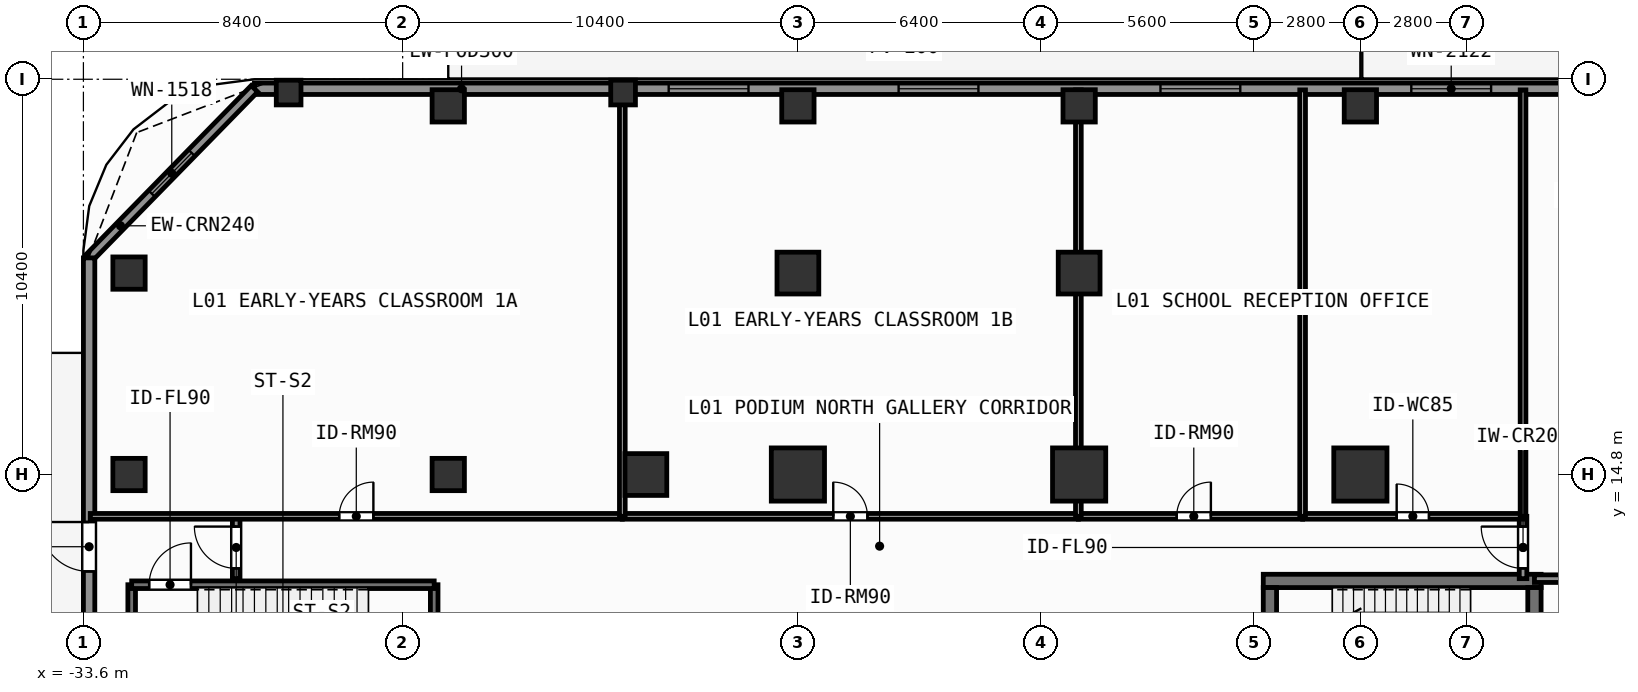
"""IFC4 building model, lengths in metres.
Left out: names, types, materials, properties, quantities, classifications, styles, units other than length and angle.
Written with IfcOpenShell. Run it as: python <this file> out.ifc"""

import sys

from ifc_helpers import new_model, si_unit, direction, frame, frame_2d, origin, origin_2d, place, context, subcontext, project, spatial, rectangle, extrude, element, fill, save


model = new_model("IFC4")
c1 = context("Model", 3, precision=1e-05, world=origin(), true_north=direction((0.0, 1.0)))
c2 = subcontext(c1, "Body", "Model", "MODEL_VIEW")
j1 = project(units=[si_unit("LENGTHUNIT", "METRE"), si_unit("PLANEANGLEUNIT", "RADIAN")], contexts=[c1])
p1 = place(None, origin())
s1 = spatial("IfcSite", under=j1, at=p1, CompositionType="ELEMENT")
p2 = place(p1, origin())
s2 = spatial("IfcBuilding", under=s1, at=p2, CompositionType="ELEMENT")
p3 = place(p2, origin())
s3 = spatial("IfcBuildingStorey", under=s2, at=p3, CompositionType="ELEMENT", Elevation=0.0)
p4 = place(p3, frame((-2.555, 12.0, 0.0), z_axis=(0.0, 0.0, 1.0), x_axis=(1.0, 0.0, 0.0)))
e1 = element("IfcWall", 1, at=p4, inside=s3, PredefinedType="SHEAR", context=c2, shape_type="SweptSolid", body=[
    extrude(rectangle(XDim=7.31, YDim=0.35, at=frame_2d((3.655, 0.0))), origin(), (0.0, 0.0, 1.0), 4.8),
])
p5 = place(p3, frame((-2.38, 8.9, 0.0), z_axis=(0.0, 0.0, 1.0), x_axis=(0.0, 1.0, 0.0)))
e2 = element("IfcWall", 2, at=p5, inside=s3, PredefinedType="SHEAR", context=c2, shape_type="SweptSolid", body=[
    extrude(rectangle(XDim=2.925, YDim=0.35, at=frame_2d((1.462, 0.0))), origin(), (0.0, 0.0, 1.0), 4.8),
])
p6 = place(p3, frame((4.58, 11.825, 0.0), z_axis=(0.0, 0.0, 1.0), x_axis=(0.0, -1.0, 0.0)))
e3 = element("IfcWall", 3, at=p6, inside=s3, PredefinedType="SHEAR", context=c2, shape_type="SweptSolid", body=[
    extrude(rectangle(XDim=2.925, YDim=0.35, at=frame_2d((1.462, 0.0))), origin(), (0.0, 0.0, 1.0), 4.8),
])
p7 = place(p6, frame((0.913, 0.0, 0.0)))
e4 = element("IfcOpeningElement", 4, at=p7, cuts=e3, PredefinedType="OPENING", context=c2, shape_type="SweptSolid", body=[
    extrude(rectangle(XDim=1.1, YDim=2.15, at=frame_2d((0.55, 1.075))), frame((0.0, 0.185, 0.0), z_axis=(0.0, -1.0, 0.0), x_axis=(1.0, 0.0, 0.0)), (0.0, 0.0, 1.0), 0.37),
])
for number, where, z_axis, x_axis in (
    (5, (-14.8, 14.8, 0.0), (0.0, 0.0, 1.0), (1.0, 0.0, 0.0)),
    (6, (-7.4, 14.8, 0.0), (0.0, 0.0, 1.0), (1.0, 0.0, 0.0)),
    (7, (0.0, 14.8, 0.0), (0.0, 0.0, 1.0), (1.0, 0.0, 0.0)),
):
    element("IfcColumn", number, at=place(p3, frame(where, z_axis=z_axis, x_axis=x_axis)), inside=s3, PredefinedType="COLUMN", context=c2, shape_type="SweptSolid", body=[
        extrude(rectangle(XDim=1.4, YDim=1.4, at=origin_2d()), origin(), (0.0, 0.0, 1.0), 4.8),
    ])
for number, where, z_axis, x_axis in (
    (8, (-18.8, 14.8, 0.0), (0.0, 0.0, 1.0), (1.0, 0.0, 0.0)),
    (9, (-14.8, 20.1, 0.0), (0.0, 0.0, 1.0), (1.0, 0.0, 0.0)),
    (10, (-7.4, 20.1, 0.0), (0.0, 0.0, 1.0), (1.0, 0.0, 0.0)),
):
    element("IfcColumn", number, at=place(p3, frame(where, z_axis=z_axis, x_axis=x_axis)), inside=s3, PredefinedType="COLUMN", context=c2, shape_type="SweptSolid", body=[
        extrude(rectangle(XDim=1.1, YDim=1.1, at=origin_2d()), origin(), (0.0, 0.0, 1.0), 4.8),
    ])
for number, where, z_axis, x_axis in (
    (11, (-32.4, 14.8, 0.0), (0.0, 0.0, 1.0), (1.0, 0.0, 0.0)),
    (12, (-24.0, 14.8, 0.0), (0.0, 0.0, 1.0), (1.0, 0.0, 0.0)),
    (13, (-24.0, 24.5, 0.0), (0.0, 0.0, 1.0), (1.0, 0.0, 0.0)),
    (14, (-14.8, 24.5, 0.0), (0.0, 0.0, 1.0), (1.0, 0.0, 0.0)),
    (15, (-7.4, 24.5, 0.0), (0.0, 0.0, 1.0), (1.0, 0.0, 0.0)),
    (16, (0.0, 24.5, 0.0), (0.0, 0.0, 1.0), (1.0, 0.0, 0.0)),
    (17, (-32.4, 20.1, 0.0), (0.0, 0.0, 1.0), (1.0, 0.0, 0.0)),
):
    element("IfcColumn", number, at=place(p3, frame(where, z_axis=z_axis, x_axis=x_axis)), inside=s3, PredefinedType="COLUMN", context=c2, shape_type="SweptSolid", body=[
        extrude(rectangle(XDim=0.85, YDim=0.85, at=origin_2d()), origin(), (0.0, 0.0, 1.0), 4.8),
    ])
for number, where, z_axis, x_axis in (
    (18, (-28.2, 24.85, 0.0), (0.0, 0.0, 1.0), (1.0, 0.0, 0.0)),
    (19, (-19.4, 24.85, 0.0), (0.0, 0.0, 1.0), (1.0, 0.0, 0.0)),
):
    element("IfcColumn", number, at=place(p3, frame(where, z_axis=z_axis, x_axis=x_axis)), inside=s3, PredefinedType="PILASTER", context=c2, shape_type="SweptSolid", body=[
        extrude(rectangle(XDim=0.65, YDim=0.65, at=origin_2d()), origin(), (0.0, 0.0, 1.0), 4.8),
    ])
p8 = place(p3, frame((-29.1, 24.95, 0.0), z_axis=(0.0, 0.0, 1.0), x_axis=(1.0, 0.0, 0.0)))
e20 = element("IfcWall", 20, at=p8, inside=s3, PredefinedType="SOLIDWALL", context=c2, shape_type="SweptSolid", body=[
    extrude(rectangle(XDim=58.2, YDim=0.3, at=frame_2d((29.1, 0.0))), origin(), (0.0, 0.0, 1.0), 4.56),
])
p9 = place(p8, frame((10.9, 0.0, 0.85)))
e21 = element("IfcOpeningElement", 21, at=p9, cuts=e20, PredefinedType="OPENING", context=c2, shape_type="SweptSolid", body=[
    extrude(rectangle(XDim=2.1, YDim=2.2, at=frame_2d((1.05, 1.1))), frame((0.0, 0.16, 0.0), z_axis=(0.0, -1.0, 0.0), x_axis=(1.0, 0.0, 0.0)), (0.0, 0.0, 1.0), 0.32),
])
p10 = place(p8, frame((16.95, 0.0, 0.85)))
e22 = element("IfcOpeningElement", 22, at=p10, cuts=e20, PredefinedType="OPENING", context=c2, shape_type="SweptSolid", body=[
    extrude(rectangle(XDim=2.1, YDim=2.2, at=frame_2d((1.05, 1.1))), frame((0.0, 0.16, 0.0), z_axis=(0.0, -1.0, 0.0), x_axis=(1.0, 0.0, 0.0)), (0.0, 0.0, 1.0), 0.32),
])
p11 = place(p8, frame((23.84, 0.0, 0.85)))
e23 = element("IfcOpeningElement", 23, at=p11, cuts=e20, PredefinedType="OPENING", context=c2, shape_type="SweptSolid", body=[
    extrude(rectangle(XDim=2.1, YDim=2.2, at=frame_2d((1.05, 1.1))), frame((0.0, 0.16, 0.0), z_axis=(0.0, -1.0, 0.0), x_axis=(1.0, 0.0, 0.0)), (0.0, 0.0, 1.0), 0.32),
])
p12 = place(p8, frame((30.44, 0.0, 0.85)))
e24 = element("IfcOpeningElement", 24, at=p12, cuts=e20, PredefinedType="OPENING", context=c2, shape_type="SweptSolid", body=[
    extrude(rectangle(XDim=2.1, YDim=2.2, at=frame_2d((1.05, 1.1))), frame((0.0, 0.16, 0.0), z_axis=(0.0, -1.0, 0.0), x_axis=(1.0, 0.0, 0.0)), (0.0, 0.0, 1.0), 0.32),
])
p13 = place(p8, frame((39.25, 0.0, 0.0)))
e25 = element("IfcOpeningElement", 25, at=p13, cuts=e20, PredefinedType="OPENING", context=c2, shape_type="SweptSolid", body=[
    extrude(rectangle(XDim=1.3, YDim=2.2, at=frame_2d((0.65, 1.1))), frame((0.0, 0.16, 0.0), z_axis=(0.0, -1.0, 0.0), x_axis=(1.0, 0.0, 0.0)), (0.0, 0.0, 1.0), 0.32),
])
p14 = place(p8, frame((49.25, 0.0, 0.0)))
e26 = element("IfcOpeningElement", 26, at=p14, cuts=e20, PredefinedType="OPENING", context=c2, shape_type="SweptSolid", body=[
    extrude(rectangle(XDim=1.3, YDim=2.2, at=frame_2d((0.65, 1.1))), frame((0.0, 0.16, 0.0), z_axis=(0.0, -1.0, 0.0), x_axis=(1.0, 0.0, 0.0)), (0.0, 0.0, 1.0), 0.32),
])
p15 = place(p3, frame((-33.45, 20.5, 0.0), z_axis=(0.0, 0.0, 1.0), x_axis=(0.69901822973, 0.715103848756, 0.0)))
e27 = element("IfcWall", 27, at=p15, inside=s3, PredefinedType="SOLIDWALL", context=c2, shape_type="SweptSolid", body=[
    extrude(rectangle(XDim=6.223, YDim=0.24, at=frame_2d((3.111, 0.0))), origin(), (0.0, 0.0, 1.0), 4.56),
])
p16 = place(p15, frame((2.362, 0.0, 0.85)))
e28 = element("IfcOpeningElement", 28, at=p16, cuts=e27, PredefinedType="OPENING", context=c2, shape_type="SweptSolid", body=[
    extrude(rectangle(XDim=1.5, YDim=1.85, at=frame_2d((0.75, 0.925))), frame((0.0, 0.13, 0.0), z_axis=(0.0, -1.0, 0.0), x_axis=(1.0, 0.0, 0.0)), (0.0, 0.0, 1.0), 0.26),
])
p17 = place(p3, frame((-33.45, -20.5, 0.0), z_axis=(0.0, 0.0, 1.0), x_axis=(0.0, 1.0, 0.0)))
e29 = element("IfcWall", 29, at=p17, inside=s3, PredefinedType="SOLIDWALL", context=c2, shape_type="SweptSolid", body=[
    extrude(rectangle(XDim=41.0, YDim=0.3, at=frame_2d((20.5, 0.0))), origin(), (0.0, 0.0, 1.0), 4.56),
])
p18 = place(p17, frame((15.9, 0.0, 0.0)))
e30 = element("IfcOpeningElement", 30, at=p18, cuts=e29, PredefinedType="OPENING", context=c2, shape_type="SweptSolid", body=[
    extrude(rectangle(XDim=2.0, YDim=2.4, at=frame_2d((1.0, 1.2))), frame((0.0, 0.16, 0.0), z_axis=(0.0, -1.0, 0.0), x_axis=(1.0, 0.0, 0.0)), (0.0, 0.0, 1.0), 0.32),
])
p19 = place(p17, frame((23.1, 0.0, 0.0)))
e31 = element("IfcOpeningElement", 31, at=p19, cuts=e29, PredefinedType="OPENING", context=c2, shape_type="SweptSolid", body=[
    extrude(rectangle(XDim=2.0, YDim=2.4, at=frame_2d((1.0, 1.2))), frame((0.0, 0.16, 0.0), z_axis=(0.0, -1.0, 0.0), x_axis=(1.0, 0.0, 0.0)), (0.0, 0.0, 1.0), 0.32),
])
p20 = place(p17, frame((6.95, 0.0, 0.0)))
e32 = element("IfcOpeningElement", 32, at=p20, cuts=e29, PredefinedType="OPENING", context=c2, shape_type="SweptSolid", body=[
    extrude(rectangle(XDim=1.3, YDim=2.2, at=frame_2d((0.65, 1.1))), frame((0.0, 0.16, 0.0), z_axis=(0.0, -1.0, 0.0), x_axis=(1.0, 0.0, 0.0)), (0.0, 0.0, 1.0), 0.32),
])
p21 = place(p17, frame((32.75, 0.0, 0.0)))
e33 = element("IfcOpeningElement", 33, at=p21, cuts=e29, PredefinedType="OPENING", context=c2, shape_type="SweptSolid", body=[
    extrude(rectangle(XDim=1.3, YDim=2.2, at=frame_2d((0.65, 1.1))), frame((0.0, 0.16, 0.0), z_axis=(0.0, -1.0, 0.0), x_axis=(1.0, 0.0, 0.0)), (0.0, 0.0, 1.0), 0.32),
])
for number, where, z_axis, x_axis in (
    (34, (-32.33, 8.48, 0.0), (0.0, 0.0, 1.0), (0.0, 1.0, 0.0)),
    (35, (-24.37, 11.9, 0.0), (0.0, 0.0, 1.0), (0.0, -1.0, 0.0)),
):
    element("IfcWall", number, at=place(p3, frame(where, z_axis=z_axis, x_axis=x_axis)), inside=s3, PredefinedType="SHEAR", context=c2, shape_type="SweptSolid", body=[
        extrude(rectangle(XDim=3.42, YDim=0.2, at=frame_2d((1.71, 0.0))), origin(), (0.0, 0.0, 1.0), 4.56),
    ])
p22 = place(p3, frame((-32.33, 11.9, 0.0), z_axis=(0.0, 0.0, 1.0), x_axis=(1.0, 0.0, 0.0)))
e36 = element("IfcWall", 36, at=p22, inside=s3, PredefinedType="SHEAR", context=c2, shape_type="SweptSolid", body=[
    extrude(rectangle(XDim=7.96, YDim=0.2, at=frame_2d((3.98, 0.0))), origin(), (0.0, 0.0, 1.0), 4.56),
])
p23 = place(p22, frame((0.46, 0.0, 0.0)))
e37 = element("IfcOpeningElement", 37, at=p23, cuts=e36, PredefinedType="OPENING", context=c2, shape_type="SweptSolid", body=[
    extrude(rectangle(XDim=1.1, YDim=2.15, at=frame_2d((0.55, 1.075))), frame((0.0, 0.11, 0.0), z_axis=(0.0, -1.0, 0.0), x_axis=(1.0, 0.0, 0.0)), (0.0, 0.0, 1.0), 0.22),
])
p24 = place(p3, frame((4.58, 12.06, 0.0), z_axis=(0.0, 0.0, 1.0), x_axis=(1.0, 0.0, 0.0)))
e38 = element("IfcWall", 38, at=p24, inside=s3, PredefinedType="SOLIDWALL", context=c2, shape_type="SweptSolid", body=[
    extrude(rectangle(XDim=3.7, YDim=0.2, at=frame_2d((1.85, 0.0))), origin(), (0.0, 0.0, 1.0), 4.56),
])
p25 = place(p24, frame((1.212, 0.0, 0.0)))
e39 = element("IfcOpeningElement", 39, at=p25, cuts=e38, PredefinedType="OPENING", context=c2, shape_type="SweptSolid", body=[
    extrude(rectangle(XDim=1.1, YDim=2.15, at=frame_2d((0.55, 1.075))), frame((0.0, 0.11, 0.0), z_axis=(0.0, -1.0, 0.0), x_axis=(1.0, 0.0, 0.0)), (0.0, 0.0, 1.0), 0.22),
])
p26 = place(p3, frame((-29.58, 12.06, 0.0), z_axis=(0.0, 0.0, 1.0), x_axis=(0.0, 1.0, 0.0)))
e40 = element("IfcWall", 40, at=p26, inside=s3, PredefinedType="SOLIDWALL", context=c2, shape_type="SweptSolid", body=[
    extrude(rectangle(XDim=1.64, YDim=0.2, at=frame_2d((0.82, 0.0))), origin(), (0.0, 0.0, 1.0), 4.56),
])
p27 = place(p26, frame((0.27, 0.0, 0.0)))
e41 = element("IfcOpeningElement", 41, at=p27, cuts=e40, PredefinedType="OPENING", context=c2, shape_type="SweptSolid", body=[
    extrude(rectangle(XDim=1.1, YDim=2.15, at=frame_2d((0.55, 1.075))), frame((0.0, 0.11, 0.0), z_axis=(0.0, -1.0, 0.0), x_axis=(1.0, 0.0, 0.0)), (0.0, 0.0, 1.0), 0.22),
])
p28 = place(p3, frame((4.28, 12.06, 0.0), z_axis=(0.0, 0.0, 1.0), x_axis=(0.0, 1.0, 0.0)))
e42 = element("IfcWall", 42, at=p28, inside=s3, PredefinedType="SOLIDWALL", context=c2, shape_type="SweptSolid", body=[
    extrude(rectangle(XDim=1.64, YDim=0.2, at=frame_2d((0.82, 0.0))), origin(), (0.0, 0.0, 1.0), 4.56),
])
p29 = place(p28, frame((0.27, 0.0, 0.0)))
e43 = element("IfcOpeningElement", 43, at=p29, cuts=e42, PredefinedType="OPENING", context=c2, shape_type="SweptSolid", body=[
    extrude(rectangle(XDim=1.1, YDim=2.15, at=frame_2d((0.55, 1.075))), frame((0.0, 0.11, 0.0), z_axis=(0.0, -1.0, 0.0), x_axis=(1.0, 0.0, 0.0)), (0.0, 0.0, 1.0), 0.22),
])
p30 = place(p3, frame((-33.42, 13.7, 0.0), z_axis=(0.0, 0.0, 1.0), x_axis=(1.0, 0.0, 0.0)))
e44 = element("IfcWall", 44, at=p30, inside=s3, PredefinedType="PARTITIONING", context=c2, shape_type="SweptSolid", body=[
    extrude(rectangle(XDim=14.0, YDim=0.15, at=frame_2d((7.0, 0.0))), origin(), (0.0, 0.0, 1.0), 4.56),
])
p31 = place(p30, frame((6.55, 0.0, 0.0)))
e45 = element("IfcOpeningElement", 45, at=p31, cuts=e44, PredefinedType="OPENING", context=c2, shape_type="SweptSolid", body=[
    extrude(rectangle(XDim=0.9, YDim=2.1, at=frame_2d((0.45, 1.05))), frame((0.0, 0.085, 0.0), z_axis=(0.0, -1.0, 0.0), x_axis=(1.0, 0.0, 0.0)), (0.0, 0.0, 1.0), 0.17),
])
p32 = place(p3, frame((-19.42, 13.7, 0.0), z_axis=(0.0, 0.0, 1.0), x_axis=(1.0, 0.0, 0.0)))
e46 = element("IfcWall", 46, at=p32, inside=s3, PredefinedType="PARTITIONING", context=c2, shape_type="SweptSolid", body=[
    extrude(rectangle(XDim=12.0, YDim=0.15, at=frame_2d((6.0, 0.0))), origin(), (0.0, 0.0, 1.0), 4.56),
])
p33 = place(p32, frame((5.55, 0.0, 0.0)))
e47 = element("IfcOpeningElement", 47, at=p33, cuts=e46, PredefinedType="OPENING", context=c2, shape_type="SweptSolid", body=[
    extrude(rectangle(XDim=0.9, YDim=2.1, at=frame_2d((0.45, 1.05))), frame((0.0, 0.085, 0.0), z_axis=(0.0, -1.0, 0.0), x_axis=(1.0, 0.0, 0.0)), (0.0, 0.0, 1.0), 0.17),
])
p34 = place(p3, frame((-7.42, 13.7, 0.0), z_axis=(0.0, 0.0, 1.0), x_axis=(1.0, 0.0, 0.0)))
e48 = element("IfcWall", 48, at=p34, inside=s3, PredefinedType="PARTITIONING", context=c2, shape_type="SweptSolid", body=[
    extrude(rectangle(XDim=5.9, YDim=0.15, at=frame_2d((2.95, 0.0))), origin(), (0.0, 0.0, 1.0), 4.56),
])
p35 = place(p34, frame((2.587, 0.0, 0.0)))
e49 = element("IfcOpeningElement", 49, at=p35, cuts=e48, PredefinedType="OPENING", context=c2, shape_type="SweptSolid", body=[
    extrude(rectangle(XDim=0.9, YDim=2.1, at=frame_2d((0.45, 1.05))), frame((0.0, 0.085, 0.0), z_axis=(0.0, -1.0, 0.0), x_axis=(1.0, 0.0, 0.0)), (0.0, 0.0, 1.0), 0.17),
])
p36 = place(p3, frame((-1.52, 13.7, 0.0), z_axis=(0.0, 0.0, 1.0), x_axis=(1.0, 0.0, 0.0)))
e50 = element("IfcWall", 50, at=p36, inside=s3, PredefinedType="PARTITIONING", context=c2, shape_type="SweptSolid", body=[
    extrude(rectangle(XDim=5.8, YDim=0.15, at=frame_2d((2.9, 0.0))), origin(), (0.0, 0.0, 1.0), 4.56),
])
p37 = place(p36, frame((2.475, 0.0, 0.0)))
e51 = element("IfcOpeningElement", 51, at=p37, cuts=e50, PredefinedType="OPENING", context=c2, shape_type="SweptSolid", body=[
    extrude(rectangle(XDim=0.85, YDim=2.1, at=frame_2d((0.425, 1.05))), frame((0.0, 0.085, 0.0), z_axis=(0.0, -1.0, 0.0), x_axis=(1.0, 0.0, 0.0)), (0.0, 0.0, 1.0), 0.17),
])
p38 = place(p3, frame((-19.42, 13.7, 0.0), z_axis=(0.0, 0.0, 1.0), x_axis=(0.0, 1.0, 0.0)))
e52 = element("IfcWall", 52, at=p38, inside=s3, PredefinedType="PARTITIONING", context=c2, shape_type="SweptSolid", body=[
    extrude(rectangle(XDim=11.22, YDim=0.15, at=frame_2d((5.61, 0.0))), origin(), (0.0, 0.0, 1.0), 4.56),
])
p39 = place(p3, frame((-7.42, 13.7, 0.0), z_axis=(0.0, 0.0, 1.0), x_axis=(0.0, 1.0, 0.0)))
e53 = element("IfcWall", 53, at=p39, inside=s3, PredefinedType="PARTITIONING", context=c2, shape_type="SweptSolid", body=[
    extrude(rectangle(XDim=11.22, YDim=0.15, at=frame_2d((5.61, 0.0))), origin(), (0.0, 0.0, 1.0), 3.85),
])
for number, where, z_axis, x_axis in (
    (54, (-1.52, 13.7, 0.0), (0.0, 0.0, 1.0), (0.0, 1.0, 0.0)),
    (55, (4.28, 13.7, 0.0), (0.0, 0.0, 1.0), (0.0, 1.0, 0.0)),
):
    element("IfcWall", number, at=place(p3, frame(where, z_axis=z_axis, x_axis=x_axis)), inside=s3, PredefinedType="PARTITIONING", context=c2, shape_type="SweptSolid", body=[
        extrude(rectangle(XDim=11.22, YDim=0.15, at=frame_2d((5.61, 0.0))), origin(), (0.0, 0.0, 1.0), 4.56),
    ])
p40 = place(p16, origin())
e56 = element("IfcWindow", 56, at=p40, inside=s3, PartitioningType="SINGLE_PANEL", PredefinedType="WINDOW", context=c2, shape_type="SweptSolid", body=[
    extrude(rectangle(XDim=1.5, YDim=1.85, at=frame_2d((0.75, 0.925))), frame((0.0, 0.03, 0.0), z_axis=(0.0, -1.0, 0.0), x_axis=(1.0, 0.0, 0.0)), (0.0, 0.0, 1.0), 0.06),
])
fill(e28, e56)
p41 = place(p9, origin())
e57 = element("IfcWindow", 57, at=p41, inside=s3, PartitioningType="SINGLE_PANEL", PredefinedType="WINDOW", context=c2, shape_type="SweptSolid", body=[
    extrude(rectangle(XDim=2.1, YDim=2.2, at=frame_2d((1.05, 1.1))), frame((0.0, 0.03, 0.0), z_axis=(0.0, -1.0, 0.0), x_axis=(1.0, 0.0, 0.0)), (0.0, 0.0, 1.0), 0.06),
])
fill(e21, e57)
p42 = place(p10, origin())
e58 = element("IfcWindow", 58, at=p42, inside=s3, PartitioningType="SINGLE_PANEL", PredefinedType="WINDOW", context=c2, shape_type="SweptSolid", body=[
    extrude(rectangle(XDim=2.1, YDim=2.2, at=frame_2d((1.05, 1.1))), frame((0.0, 0.03, 0.0), z_axis=(0.0, -1.0, 0.0), x_axis=(1.0, 0.0, 0.0)), (0.0, 0.0, 1.0), 0.06),
])
fill(e22, e58)
p43 = place(p11, origin())
e59 = element("IfcWindow", 59, at=p43, inside=s3, PartitioningType="SINGLE_PANEL", PredefinedType="WINDOW", context=c2, shape_type="SweptSolid", body=[
    extrude(rectangle(XDim=2.1, YDim=2.2, at=frame_2d((1.05, 1.1))), frame((0.0, 0.03, 0.0), z_axis=(0.0, -1.0, 0.0), x_axis=(1.0, 0.0, 0.0)), (0.0, 0.0, 1.0), 0.06),
])
fill(e23, e59)
p44 = place(p12, origin())
e60 = element("IfcWindow", 60, at=p44, inside=s3, PartitioningType="SINGLE_PANEL", PredefinedType="WINDOW", context=c2, shape_type="SweptSolid", body=[
    extrude(rectangle(XDim=2.1, YDim=2.2, at=frame_2d((1.05, 1.1))), frame((0.0, 0.03, 0.0), z_axis=(0.0, -1.0, 0.0), x_axis=(1.0, 0.0, 0.0)), (0.0, 0.0, 1.0), 0.06),
])
fill(e24, e60)
p45 = place(p21, origin())
e61 = element("IfcDoor", 61, at=p45, inside=s3, OperationType="SINGLE_SWING_RIGHT", PredefinedType="DOOR", context=c2, shape_type="SweptSolid", body=[
    extrude(rectangle(XDim=1.3, YDim=2.2, at=frame_2d((0.65, 1.1))), frame((0.0, 0.025, 0.0), z_axis=(0.0, -1.0, 0.0), x_axis=(1.0, 0.0, 0.0)), (0.0, 0.0, 1.0), 0.05),
])
fill(e33, e61)
p46 = place(p23, origin())
e62 = element("IfcDoor", 62, at=p46, inside=s3, OperationType="SINGLE_SWING_RIGHT", PredefinedType="DOOR", context=c2, shape_type="SweptSolid", body=[
    extrude(rectangle(XDim=1.1, YDim=2.15, at=frame_2d((0.55, 1.075))), frame((0.0, 0.025, 0.0), z_axis=(0.0, -1.0, 0.0), x_axis=(1.0, 0.0, 0.0)), (0.0, 0.0, 1.0), 0.05),
])
fill(e37, e62)
p47 = place(p27, origin())
e63 = element("IfcDoor", 63, at=p47, inside=s3, OperationType="SINGLE_SWING_RIGHT", PredefinedType="DOOR", context=c2, shape_type="SweptSolid", body=[
    extrude(rectangle(XDim=1.1, YDim=2.15, at=frame_2d((0.55, 1.075))), frame((0.0, 0.025, 0.0), z_axis=(0.0, -1.0, 0.0), x_axis=(1.0, 0.0, 0.0)), (0.0, 0.0, 1.0), 0.05),
])
fill(e41, e63)
p48 = place(p29, origin())
e64 = element("IfcDoor", 64, at=p48, inside=s3, OperationType="SINGLE_SWING_RIGHT", PredefinedType="DOOR", context=c2, shape_type="SweptSolid", body=[
    extrude(rectangle(XDim=1.1, YDim=2.15, at=frame_2d((0.55, 1.075))), frame((0.0, 0.025, 0.0), z_axis=(0.0, -1.0, 0.0), x_axis=(1.0, 0.0, 0.0)), (0.0, 0.0, 1.0), 0.05),
])
fill(e43, e64)
p49 = place(p31, origin())
e65 = element("IfcDoor", 65, at=p49, inside=s3, OperationType="SINGLE_SWING_RIGHT", PredefinedType="DOOR", context=c2, shape_type="SweptSolid", body=[
    extrude(rectangle(XDim=0.9, YDim=2.1, at=frame_2d((0.45, 1.05))), frame((0.0, 0.025, 0.0), z_axis=(0.0, -1.0, 0.0), x_axis=(1.0, 0.0, 0.0)), (0.0, 0.0, 1.0), 0.05),
])
fill(e45, e65)
p50 = place(p33, origin())
e66 = element("IfcDoor", 66, at=p50, inside=s3, OperationType="SINGLE_SWING_LEFT", PredefinedType="DOOR", context=c2, shape_type="SweptSolid", body=[
    extrude(rectangle(XDim=0.9, YDim=2.1, at=frame_2d((0.45, 1.05))), frame((0.0, 0.025, 0.0), z_axis=(0.0, -1.0, 0.0), x_axis=(1.0, 0.0, 0.0)), (0.0, 0.0, 1.0), 0.05),
])
fill(e47, e66)
p51 = place(p35, origin())
e67 = element("IfcDoor", 67, at=p51, inside=s3, OperationType="SINGLE_SWING_RIGHT", PredefinedType="DOOR", context=c2, shape_type="SweptSolid", body=[
    extrude(rectangle(XDim=0.9, YDim=2.1, at=frame_2d((0.45, 1.05))), frame((0.0, 0.025, 0.0), z_axis=(0.0, -1.0, 0.0), x_axis=(1.0, 0.0, 0.0)), (0.0, 0.0, 1.0), 0.05),
])
fill(e49, e67)
p52 = place(p37, origin())
e68 = element("IfcDoor", 68, at=p52, inside=s3, OperationType="SINGLE_SWING_LEFT", PredefinedType="DOOR", context=c2, shape_type="SweptSolid", body=[
    extrude(rectangle(XDim=0.85, YDim=2.1, at=frame_2d((0.425, 1.05))), frame((0.0, 0.025, 0.0), z_axis=(0.0, -1.0, 0.0), x_axis=(1.0, 0.0, 0.0)), (0.0, 0.0, 1.0), 0.05),
])
fill(e51, e68)
save(model, sys.argv[1])
